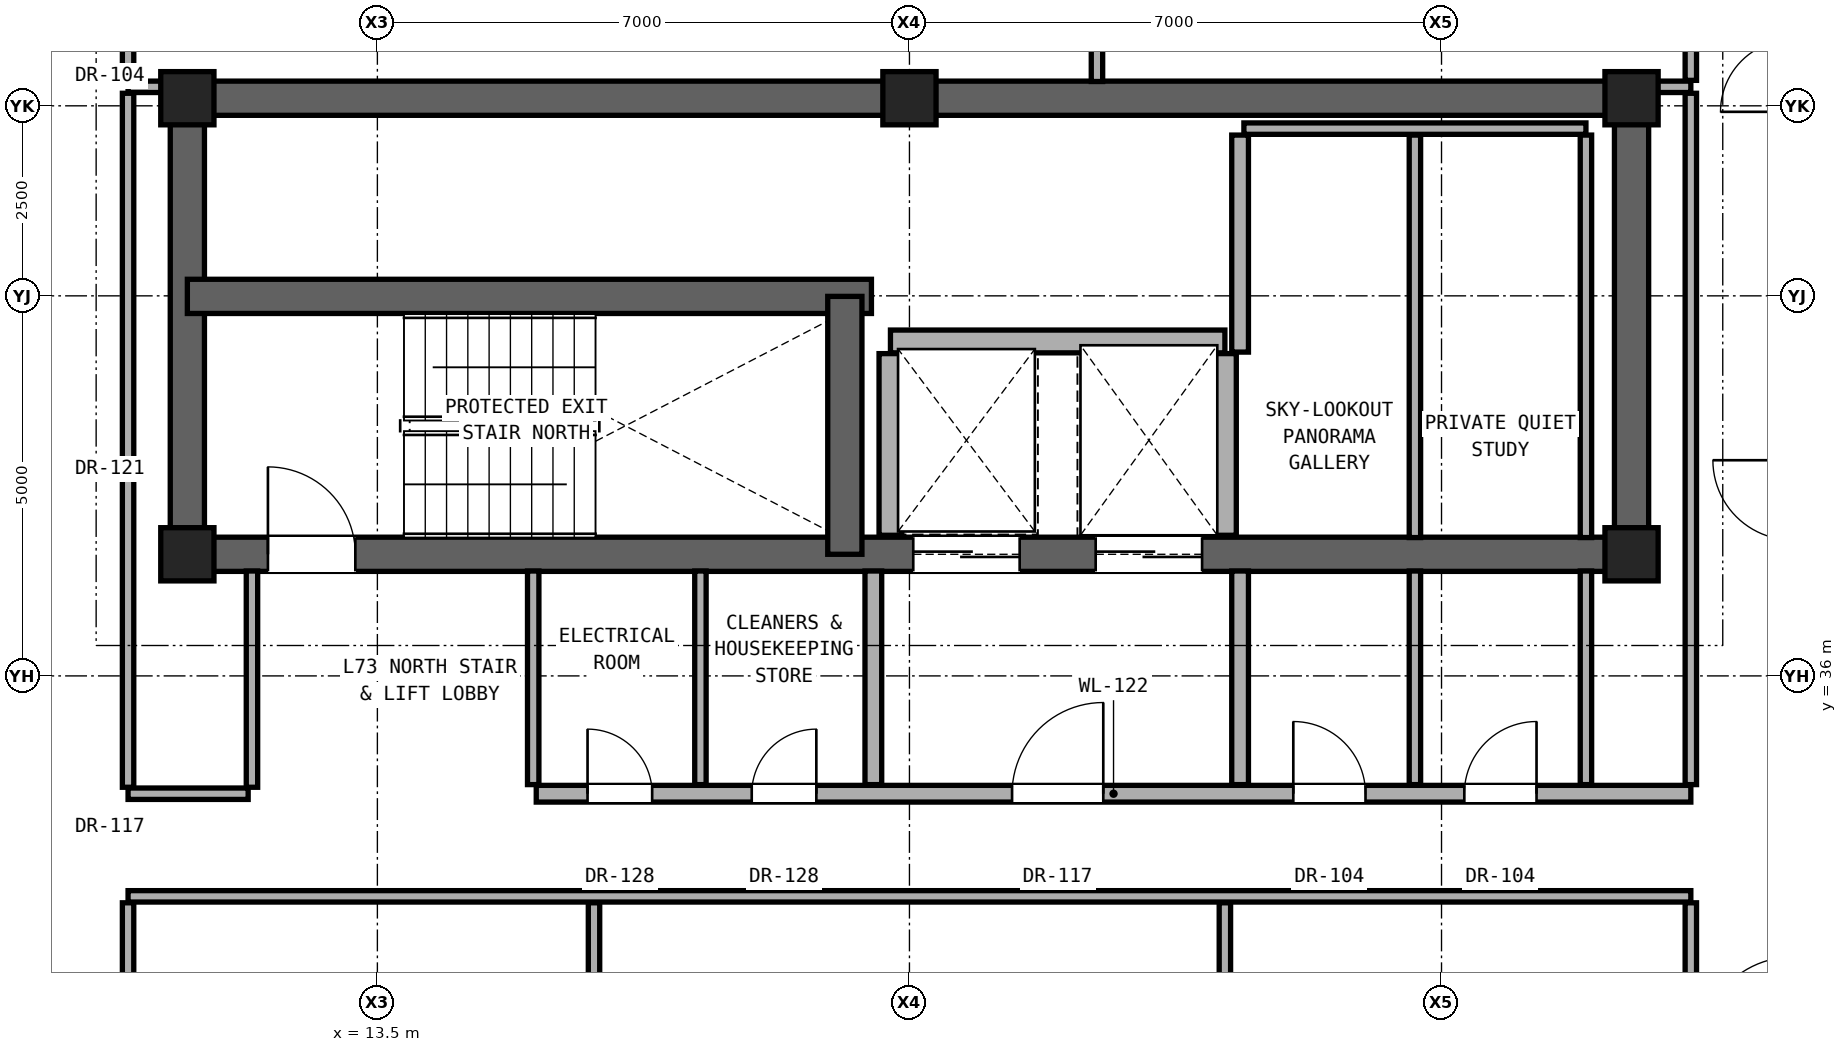
"""IFC4 building model, lengths in metres.
Left out: names, types, materials, properties, quantities, classifications, styles, units other than length and angle.
Written with IfcOpenShell. Run it as: python <this file> out.ifc"""

import sys

from ifc_helpers import new_model, si_unit, direction, frame, frame_2d, origin, origin_2d, place, context, subcontext, project, spatial, rectangle, extrude, element, fill, save


model = new_model("IFC4")
c1 = context("Model", 3, precision=1e-05, world=origin(), true_north=direction((0.0, 1.0)))
c2 = subcontext(c1, "Body", "Model", "MODEL_VIEW")
j1 = project(units=[si_unit("LENGTHUNIT", "METRE"), si_unit("PLANEANGLEUNIT", "RADIAN")], contexts=[c1])
p1 = place(None, origin())
s1 = spatial("IfcSite", under=j1, at=p1, CompositionType="ELEMENT")
p2 = place(p1, origin())
s2 = spatial("IfcBuilding", under=s1, at=p2, CompositionType="ELEMENT")
p3 = place(p2, frame((0.0, 0.0, 256.3)))
s3 = spatial("IfcBuildingStorey", under=s2, at=p3, CompositionType="ELEMENT", Elevation=256.3)
for number, where, z_axis, x_axis in (
    (1, (11.0, 37.6, 0.0), (0.0, 0.0, 1.0), (1.0, 0.0, 0.0)),
    (2, (30.0, 37.6, 0.0), (0.0, 0.0, 1.0), (1.0, 0.0, 0.0)),
    (3, (11.0, 43.6, 0.0), (0.0, 0.0, 1.0), (1.0, 0.0, 0.0)),
    (4, (20.5, 43.6, 0.0), (0.0, 0.0, 1.0), (1.0, 0.0, 0.0)),
    (5, (30.0, 43.6, 0.0), (0.0, 0.0, 1.0), (1.0, 0.0, 0.0)),
):
    element("IfcColumn", number, at=place(p3, frame(where, z_axis=z_axis, x_axis=x_axis)), inside=s3, PredefinedType="COLUMN", context=c2, shape_type="SweptSolid", body=[
        extrude(rectangle(XDim=0.7, YDim=0.7, at=origin_2d()), origin(), (0.0, 0.0, 1.0), 3.6),
    ])
p4 = place(p3, frame((11.0, 43.6, 0.0), z_axis=(0.0, 0.0, 1.0), x_axis=(1.0, 0.0, 0.0)))
e6 = element("IfcWall", 6, at=p4, inside=s3, PredefinedType="SHEAR", context=c2, shape_type="SweptSolid", body=[
    extrude(rectangle(XDim=19.0, YDim=0.45, at=frame_2d((9.5, 0.0))), origin(), (0.0, 0.0, 1.0), 3.4),
])
for number, where, z_axis, x_axis in (
    (7, (11.0, 37.6, 0.0), (0.0, 0.0, 1.0), (0.0, 1.0, 0.0)),
    (8, (30.0, 37.6, 0.0), (0.0, 0.0, 1.0), (0.0, 1.0, 0.0)),
):
    element("IfcWall", number, at=place(p3, frame(where, z_axis=z_axis, x_axis=x_axis)), inside=s3, PredefinedType="SHEAR", context=c2, shape_type="SweptSolid", body=[
        extrude(rectangle(XDim=6.0, YDim=0.45, at=frame_2d((3.0, 0.0))), origin(), (0.0, 0.0, 1.0), 3.4),
    ])
p5 = place(p3, frame((11.0, 37.6, 0.0), z_axis=(0.0, 0.0, 1.0), x_axis=(1.0, 0.0, 0.0)))
e9 = element("IfcWall", 9, at=p5, inside=s3, PredefinedType="SHEAR", context=c2, shape_type="SweptSolid", body=[
    extrude(rectangle(XDim=19.0, YDim=0.45, at=frame_2d((9.5, 0.0))), origin(), (0.0, 0.0, 1.0), 3.4),
])
p6 = place(p5, frame((1.06, 0.0, 0.0)))
e10 = element("IfcOpeningElement", 10, at=p6, cuts=e9, PredefinedType="OPENING", context=c2, shape_type="SweptSolid", body=[
    extrude(rectangle(XDim=1.15, YDim=2.2, at=frame_2d((0.575, 1.1))), frame((0.0, 0.235, 0.0), z_axis=(0.0, -1.0, 0.0), x_axis=(1.0, 0.0, 0.0)), (0.0, 0.0, 1.0), 0.47),
])
p7 = place(p5, frame((9.55, 0.0, 0.0)))
e11 = element("IfcOpeningElement", 11, at=p7, cuts=e9, PredefinedType="OPENING", context=c2, shape_type="SweptSolid", body=[
    extrude(rectangle(XDim=1.4, YDim=2.35, at=frame_2d((0.7, 1.175))), frame((0.0, 0.235, 0.0), z_axis=(0.0, -1.0, 0.0), x_axis=(1.0, 0.0, 0.0)), (0.0, 0.0, 1.0), 0.47),
])
p8 = place(p5, frame((11.95, 0.0, 0.0)))
e12 = element("IfcOpeningElement", 12, at=p8, cuts=e9, PredefinedType="OPENING", context=c2, shape_type="SweptSolid", body=[
    extrude(rectangle(XDim=1.4, YDim=2.35, at=frame_2d((0.7, 1.175))), frame((0.0, 0.235, 0.0), z_axis=(0.0, -1.0, 0.0), x_axis=(1.0, 0.0, 0.0)), (0.0, 0.0, 1.0), 0.47),
])
p9 = place(p3, frame((11.0, 40.993, 0.0), z_axis=(0.0, 0.0, 1.0), x_axis=(1.0, 0.0, 0.0)))
e13 = element("IfcWall", 13, at=p9, inside=s3, PredefinedType="SHEAR", context=c2, shape_type="SweptSolid", body=[
    extrude(rectangle(XDim=9.0, YDim=0.45, at=frame_2d((4.5, 0.0))), origin(), (0.0, 0.0, 1.0), 3.4),
])
p10 = place(p3, frame((19.65, 37.6, 0.0), z_axis=(0.0, 0.0, 1.0), x_axis=(0.0, 1.0, 0.0)))
e14 = element("IfcWall", 14, at=p10, inside=s3, PredefinedType="SHEAR", context=c2, shape_type="SweptSolid", body=[
    extrude(rectangle(XDim=3.393, YDim=0.45, at=frame_2d((1.696, 0.0))), origin(), (0.0, 0.0, 1.0), 3.4),
])
p11 = place(p3, frame((10.22, 33.1, 0.0), z_axis=(0.0, 0.0, 1.0), x_axis=(1.0, 0.0, 0.0)))
e15 = element("IfcWall", 15, at=p11, inside=s3, PredefinedType="PARTITIONING", context=c2, shape_type="SweptSolid", body=[
    extrude(rectangle(XDim=20.56, YDim=0.15, at=frame_2d((10.28, 0.0))), origin(), (0.0, 0.0, 1.0), 2.536),
])
p12 = place(p3, frame((10.22, 34.45, 0.0), z_axis=(0.0, 0.0, 1.0), x_axis=(1.0, 0.0, 0.0)))
e16 = element("IfcWall", 16, at=p12, inside=s3, PredefinedType="PARTITIONING", context=c2, shape_type="SweptSolid", body=[
    extrude(rectangle(XDim=1.58, YDim=0.15, at=frame_2d((0.79, 0.0))), origin(), (0.0, 0.0, 1.0), 2.536),
])
p13 = place(p3, frame((15.59, 34.45, 0.0), z_axis=(0.0, 0.0, 1.0), x_axis=(1.0, 0.0, 0.0)))
e17 = element("IfcWall", 17, at=p13, inside=s3, PredefinedType="SOLIDWALL", context=c2, shape_type="SweptSolid", body=[
    extrude(rectangle(XDim=15.19, YDim=0.22, at=frame_2d((7.595, 0.0))), origin(), (0.0, 0.0, 1.0), 2.536),
])
p14 = place(p13, frame((6.26, 0.0, 0.0)))
e18 = element("IfcOpeningElement", 18, at=p14, cuts=e17, PredefinedType="OPENING", context=c2, shape_type="SweptSolid", body=[
    extrude(rectangle(XDim=1.2, YDim=2.25, at=frame_2d((0.6, 1.125))), frame((0.0, 0.12, 0.0), z_axis=(0.0, -1.0, 0.0), x_axis=(1.0, 0.0, 0.0)), (0.0, 0.0, 1.0), 0.24),
])
p15 = place(p13, frame((9.96, 0.0, 0.0)))
e19 = element("IfcOpeningElement", 19, at=p15, cuts=e17, PredefinedType="OPENING", context=c2, shape_type="SweptSolid", body=[
    extrude(rectangle(XDim=0.95, YDim=2.15, at=frame_2d((0.475, 1.075))), frame((0.0, 0.12, 0.0), z_axis=(0.0, -1.0, 0.0), x_axis=(1.0, 0.0, 0.0)), (0.0, 0.0, 1.0), 0.24),
])
p16 = place(p13, frame((12.21, 0.0, 0.0)))
e20 = element("IfcOpeningElement", 20, at=p16, cuts=e17, PredefinedType="OPENING", context=c2, shape_type="SweptSolid", body=[
    extrude(rectangle(XDim=0.95, YDim=2.15, at=frame_2d((0.475, 1.075))), frame((0.0, 0.12, 0.0), z_axis=(0.0, -1.0, 0.0), x_axis=(1.0, 0.0, 0.0)), (0.0, 0.0, 1.0), 0.24),
])
p17 = place(p13, frame((0.675, 0.0, 0.0)))
e21 = element("IfcOpeningElement", 21, at=p17, cuts=e17, PredefinedType="OPENING", context=c2, shape_type="SweptSolid", body=[
    extrude(rectangle(XDim=0.85, YDim=2.01, at=frame_2d((0.425, 1.005))), frame((0.0, 0.12, 0.0), z_axis=(0.0, -1.0, 0.0), x_axis=(1.0, 0.0, 0.0)), (0.0, 0.0, 1.0), 0.24),
])
p18 = place(p13, frame((2.835, 0.0, 0.0)))
e22 = element("IfcOpeningElement", 22, at=p18, cuts=e17, PredefinedType="OPENING", context=c2, shape_type="SweptSolid", body=[
    extrude(rectangle(XDim=0.85, YDim=2.01, at=frame_2d((0.425, 1.005))), frame((0.0, 0.12, 0.0), z_axis=(0.0, -1.0, 0.0), x_axis=(1.0, 0.0, 0.0)), (0.0, 0.0, 1.0), 0.24),
])
p19 = place(p3, frame((20.25, 40.4, 0.0), z_axis=(0.0, 0.0, 1.0), x_axis=(1.0, 0.0, 0.0)))
e23 = element("IfcWall", 23, at=p19, inside=s3, PredefinedType="SOLIDWALL", context=c2, shape_type="SweptSolid", body=[
    extrude(rectangle(XDim=4.4, YDim=0.3, at=frame_2d((2.2, 0.0))), origin(), (0.0, 0.0, 1.0), 3.4),
])
p20 = place(p3, frame((24.9, 43.2, 0.0), z_axis=(0.0, 0.0, 1.0), x_axis=(1.0, 0.0, 0.0)))
e24 = element("IfcWall", 24, at=p20, inside=s3, PredefinedType="PARTITIONING", context=c2, shape_type="SweptSolid", body=[
    extrude(rectangle(XDim=4.5, YDim=0.15, at=frame_2d((2.25, 0.0))), origin(), (0.0, 0.0, 1.0), 3.4),
])
for number, where, z_axis, x_axis in (
    (25, (10.22, 43.75, 0.0), (0.0, 0.0, 1.0), (1.0, 0.0, 0.0)),
    (26, (30.22, 43.75, 0.0), (0.0, 0.0, 1.0), (1.0, 0.0, 0.0)),
):
    element("IfcWall", number, at=place(p3, frame(where, z_axis=z_axis, x_axis=x_axis)), inside=s3, PredefinedType="PARTITIONING", context=c2, shape_type="SweptSolid", body=[
        extrude(rectangle(XDim=0.56, YDim=0.15, at=frame_2d((0.28, 0.0))), origin(), (0.0, 0.0, 1.0), 3.4),
    ])
p21 = place(p3, frame((10.22, 22.935, 0.0), z_axis=(0.0, 0.0, 1.0), x_axis=(0.0, 1.0, 0.0)))
e27 = element("IfcWall", 27, at=p21, inside=s3, PredefinedType="PARTITIONING", context=c2, shape_type="SweptSolid", body=[
    extrude(rectangle(XDim=10.08, YDim=0.15, at=frame_2d((5.04, 0.0))), origin(), (0.0, 0.0, 1.0), 2.696),
])
p22 = place(p21, frame((4.44, 0.0, 0.0)))
e28 = element("IfcOpeningElement", 28, at=p22, cuts=e27, PredefinedType="OPENING", context=c2, shape_type="SweptSolid", body=[
    extrude(rectangle(XDim=1.2, YDim=2.25, at=frame_2d((0.6, 1.125))), frame((0.0, 0.085, 0.0), z_axis=(0.0, -1.0, 0.0), x_axis=(1.0, 0.0, 0.0)), (0.0, 0.0, 1.0), 0.17),
])
p23 = place(p3, frame((10.22, 34.535, 0.0), z_axis=(0.0, 0.0, 1.0), x_axis=(0.0, 1.0, 0.0)))
e29 = element("IfcWall", 29, at=p23, inside=s3, PredefinedType="PARTITIONING", context=c2, shape_type="SweptSolid", body=[
    extrude(rectangle(XDim=9.13, YDim=0.15, at=frame_2d((4.565, 0.0))), origin(), (0.0, 0.0, 1.0), 2.792),
])
p24 = place(p3, frame((10.22, 43.835, 0.0), z_axis=(0.0, 0.0, 1.0), x_axis=(0.0, 1.0, 0.0)))
e30 = element("IfcWall", 30, at=p24, inside=s3, PredefinedType="PARTITIONING", context=c2, shape_type="SweptSolid", body=[
    extrude(rectangle(XDim=2.651, YDim=0.15, at=frame_2d((1.326, 0.0))), origin(), (0.0, 0.0, 1.0), 3.4),
])
p25 = place(p24, frame((0.801, 0.0, 0.0)))
e31 = element("IfcOpeningElement", 31, at=p25, cuts=e30, PredefinedType="OPENING", context=c2, shape_type="SweptSolid", body=[
    extrude(rectangle(XDim=1.05, YDim=2.2, at=frame_2d((0.525, 1.1))), frame((0.0, 0.085, 0.0), z_axis=(0.0, -1.0, 0.0), x_axis=(1.0, 0.0, 0.0)), (0.0, 0.0, 1.0), 0.17),
])
p26 = place(p3, frame((11.85, 34.535, 0.0), z_axis=(0.0, 0.0, 1.0), x_axis=(0.0, 1.0, 0.0)))
e32 = element("IfcWall", 32, at=p26, inside=s3, PredefinedType="PARTITIONING", context=c2, shape_type="SweptSolid", body=[
    extrude(rectangle(XDim=2.845, YDim=0.15, at=frame_2d((1.422, 0.0))), origin(), (0.0, 0.0, 1.0), 3.4),
])
p27 = place(p3, frame((15.55, 34.57, 0.0), z_axis=(0.0, 0.0, 1.0), x_axis=(0.0, 1.0, 0.0)))
e33 = element("IfcWall", 33, at=p27, inside=s3, PredefinedType="PARTITIONING", context=c2, shape_type="SweptSolid", body=[
    extrude(rectangle(XDim=2.81, YDim=0.15, at=frame_2d((1.405, 0.0))), origin(), (0.0, 0.0, 1.0), 3.4),
])
p28 = place(p3, frame((16.35, 24.385, 0.0), z_axis=(0.0, 0.0, 1.0), x_axis=(0.0, 1.0, 0.0)))
e34 = element("IfcWall", 34, at=p28, inside=s3, PredefinedType="PARTITIONING", context=c2, shape_type="SweptSolid", body=[
    extrude(rectangle(XDim=8.63, YDim=0.15, at=frame_2d((4.315, 0.0))), origin(), (0.0, 0.0, 1.0), 2.536),
])
p29 = place(p3, frame((17.75, 34.57, 0.0), z_axis=(0.0, 0.0, 1.0), x_axis=(0.0, 1.0, 0.0)))
e35 = element("IfcWall", 35, at=p29, inside=s3, PredefinedType="PARTITIONING", context=c2, shape_type="SweptSolid", body=[
    extrude(rectangle(XDim=2.81, YDim=0.15, at=frame_2d((1.405, 0.0))), origin(), (0.0, 0.0, 1.0), 3.4),
])
p30 = place(p3, frame((20.025, 34.57, 0.0), z_axis=(0.0, 0.0, 1.0), x_axis=(0.0, 1.0, 0.0)))
e36 = element("IfcWall", 36, at=p30, inside=s3, PredefinedType="SOLIDWALL", context=c2, shape_type="SweptSolid", body=[
    extrude(rectangle(XDim=2.81, YDim=0.22, at=frame_2d((1.405, 0.0))), origin(), (0.0, 0.0, 1.0), 3.4),
])
p31 = place(p3, frame((20.25, 37.85, 0.0), z_axis=(0.0, 0.0, 1.0), x_axis=(0.0, 1.0, 0.0)))
e37 = element("IfcWall", 37, at=p31, inside=s3, PredefinedType="SOLIDWALL", context=c2, shape_type="SweptSolid", body=[
    extrude(rectangle(XDim=2.39, YDim=0.3, at=frame_2d((1.195, 0.0))), origin(), (0.0, 0.0, 1.0), 3.4),
])
p32 = place(p3, frame((22.967, 43.82, 0.0), z_axis=(0.0, 0.0, 1.0), x_axis=(0.0, 1.0, 0.0)))
e38 = element("IfcWall", 38, at=p32, inside=s3, PredefinedType="PARTITIONING", context=c2, shape_type="SweptSolid", body=[
    extrude(rectangle(XDim=2.666, YDim=0.15, at=frame_2d((1.333, 0.0))), origin(), (0.0, 0.0, 1.0), 3.4),
])
p33 = place(p3, frame((24.65, 24.385, 0.0), z_axis=(0.0, 0.0, 1.0), x_axis=(0.0, 1.0, 0.0)))
e39 = element("IfcWall", 39, at=p33, inside=s3, PredefinedType="PARTITIONING", context=c2, shape_type="SweptSolid", body=[
    extrude(rectangle(XDim=8.63, YDim=0.15, at=frame_2d((4.315, 0.0))), origin(), (0.0, 0.0, 1.0), 2.536),
])
p34 = place(p3, frame((24.65, 37.85, 0.0), z_axis=(0.0, 0.0, 1.0), x_axis=(0.0, 1.0, 0.0)))
e40 = element("IfcWall", 40, at=p34, inside=s3, PredefinedType="SOLIDWALL", context=c2, shape_type="SweptSolid", body=[
    extrude(rectangle(XDim=2.39, YDim=0.3, at=frame_2d((1.195, 0.0))), origin(), (0.0, 0.0, 1.0), 3.4),
])
p35 = place(p3, frame((24.85, 34.57, 0.0), z_axis=(0.0, 0.0, 1.0), x_axis=(0.0, 1.0, 0.0)))
e41 = element("IfcWall", 41, at=p35, inside=s3, PredefinedType="SOLIDWALL", context=c2, shape_type="SweptSolid", body=[
    extrude(rectangle(XDim=2.81, YDim=0.22, at=frame_2d((1.405, 0.0))), origin(), (0.0, 0.0, 1.0), 3.4),
])
p36 = place(p3, frame((24.85, 40.26, 0.0), z_axis=(0.0, 0.0, 1.0), x_axis=(0.0, 1.0, 0.0)))
e42 = element("IfcWall", 42, at=p36, inside=s3, PredefinedType="SOLIDWALL", context=c2, shape_type="SweptSolid", body=[
    extrude(rectangle(XDim=2.855, YDim=0.22, at=frame_2d((1.427, 0.0))), origin(), (0.0, 0.0, 1.0), 3.4),
])
p37 = place(p3, frame((27.15, 34.57, 0.0), z_axis=(0.0, 0.0, 1.0), x_axis=(0.0, 1.0, 0.0)))
e43 = element("IfcWall", 43, at=p37, inside=s3, PredefinedType="PARTITIONING", context=c2, shape_type="SweptSolid", body=[
    extrude(rectangle(XDim=2.81, YDim=0.15, at=frame_2d((1.405, 0.0))), origin(), (0.0, 0.0, 1.0), 3.4),
])
p38 = place(p3, frame((27.15, 37.82, 0.0), z_axis=(0.0, 0.0, 1.0), x_axis=(0.0, 1.0, 0.0)))
e44 = element("IfcWall", 44, at=p38, inside=s3, PredefinedType="PARTITIONING", context=c2, shape_type="SweptSolid", body=[
    extrude(rectangle(XDim=5.295, YDim=0.15, at=frame_2d((2.647, 0.0))), origin(), (0.0, 0.0, 1.0), 3.4),
])
p39 = place(p3, frame((29.4, 34.57, 0.0), z_axis=(0.0, 0.0, 1.0), x_axis=(0.0, 1.0, 0.0)))
e45 = element("IfcWall", 45, at=p39, inside=s3, PredefinedType="PARTITIONING", context=c2, shape_type="SweptSolid", body=[
    extrude(rectangle(XDim=2.81, YDim=0.15, at=frame_2d((1.405, 0.0))), origin(), (0.0, 0.0, 1.0), 3.4),
])
p40 = place(p3, frame((29.4, 37.82, 0.0), z_axis=(0.0, 0.0, 1.0), x_axis=(0.0, 1.0, 0.0)))
e46 = element("IfcWall", 46, at=p40, inside=s3, PredefinedType="PARTITIONING", context=c2, shape_type="SweptSolid", body=[
    extrude(rectangle(XDim=5.295, YDim=0.15, at=frame_2d((2.647, 0.0))), origin(), (0.0, 0.0, 1.0), 3.4),
])
p41 = place(p3, frame((30.78, 19.985, 0.0), z_axis=(0.0, 0.0, 1.0), x_axis=(0.0, 1.0, 0.0)))
e47 = element("IfcWall", 47, at=p41, inside=s3, PredefinedType="PARTITIONING", context=c2, shape_type="SweptSolid", body=[
    extrude(rectangle(XDim=13.03, YDim=0.15, at=frame_2d((6.515, 0.0))), origin(), (0.0, 0.0, 1.0), 2.696),
])
p42 = place(p41, frame((5.915, 0.0, 0.0)))
e48 = element("IfcOpeningElement", 48, at=p42, cuts=e47, PredefinedType="OPENING", context=c2, shape_type="SweptSolid", body=[
    extrude(rectangle(XDim=1.2, YDim=2.25, at=frame_2d((0.6, 1.125))), frame((0.0, 0.085, 0.0), z_axis=(0.0, -1.0, 0.0), x_axis=(1.0, 0.0, 0.0)), (0.0, 0.0, 1.0), 0.17),
])
p43 = place(p3, frame((30.78, 34.57, 0.0), z_axis=(0.0, 0.0, 1.0), x_axis=(0.0, 1.0, 0.0)))
e49 = element("IfcWall", 49, at=p43, inside=s3, PredefinedType="PARTITIONING", context=c2, shape_type="SweptSolid", body=[
    extrude(rectangle(XDim=9.095, YDim=0.15, at=frame_2d((4.547, 0.0))), origin(), (0.0, 0.0, 1.0), 2.792),
])
p44 = place(p3, frame((30.78, 43.835, 0.0), z_axis=(0.0, 0.0, 1.0), x_axis=(0.0, 1.0, 0.0)))
e50 = element("IfcWall", 50, at=p44, inside=s3, PredefinedType="PARTITIONING", context=c2, shape_type="SweptSolid", body=[
    extrude(rectangle(XDim=2.651, YDim=0.15, at=frame_2d((1.326, 0.0))), origin(), (0.0, 0.0, 1.0), 3.4),
])
p45 = place(p44, frame((0.801, 0.0, 0.0)))
e51 = element("IfcOpeningElement", 51, at=p45, cuts=e50, PredefinedType="OPENING", context=c2, shape_type="SweptSolid", body=[
    extrude(rectangle(XDim=1.05, YDim=2.2, at=frame_2d((0.525, 1.1))), frame((0.0, 0.085, 0.0), z_axis=(0.0, -1.0, 0.0), x_axis=(1.0, 0.0, 0.0)), (0.0, 0.0, 1.0), 0.17),
])
p46 = place(p6, origin())
e52 = element("IfcDoor", 52, at=p46, inside=s3, OperationType="SINGLE_SWING_LEFT", PredefinedType="DOOR", context=c2, shape_type="SweptSolid", body=[
    extrude(rectangle(XDim=1.15, YDim=2.2, at=frame_2d((0.575, 1.1))), frame((0.0, 0.025, 0.0), z_axis=(0.0, -1.0, 0.0), x_axis=(1.0, 0.0, 0.0)), (0.0, 0.0, 1.0), 0.05),
])
fill(e10, e52)
p47 = place(p14, origin())
e53 = element("IfcDoor", 53, at=p47, inside=s3, OperationType="SINGLE_SWING_RIGHT", PredefinedType="DOOR", context=c2, shape_type="SweptSolid", body=[
    extrude(rectangle(XDim=1.2, YDim=2.25, at=frame_2d((0.6, 1.125))), frame((0.0, 0.025, 0.0), z_axis=(0.0, -1.0, 0.0), x_axis=(1.0, 0.0, 0.0)), (0.0, 0.0, 1.0), 0.05),
])
fill(e18, e53)
p48 = place(p15, origin())
e54 = element("IfcDoor", 54, at=p48, inside=s3, OperationType="SINGLE_SWING_LEFT", PredefinedType="DOOR", context=c2, shape_type="SweptSolid", body=[
    extrude(rectangle(XDim=0.95, YDim=2.15, at=frame_2d((0.475, 1.075))), frame((0.0, 0.025, 0.0), z_axis=(0.0, -1.0, 0.0), x_axis=(1.0, 0.0, 0.0)), (0.0, 0.0, 1.0), 0.05),
])
fill(e19, e54)
p49 = place(p16, origin())
e55 = element("IfcDoor", 55, at=p49, inside=s3, OperationType="SINGLE_SWING_RIGHT", PredefinedType="DOOR", context=c2, shape_type="SweptSolid", body=[
    extrude(rectangle(XDim=0.95, YDim=2.15, at=frame_2d((0.475, 1.075))), frame((0.0, 0.025, 0.0), z_axis=(0.0, -1.0, 0.0), x_axis=(1.0, 0.0, 0.0)), (0.0, 0.0, 1.0), 0.05),
])
fill(e20, e55)
p50 = place(p17, origin())
e56 = element("IfcDoor", 56, at=p50, inside=s3, OperationType="SINGLE_SWING_LEFT", PredefinedType="DOOR", context=c2, shape_type="SweptSolid", body=[
    extrude(rectangle(XDim=0.85, YDim=2.01, at=frame_2d((0.425, 1.005))), frame((0.0, 0.025, 0.0), z_axis=(0.0, -1.0, 0.0), x_axis=(1.0, 0.0, 0.0)), (0.0, 0.0, 1.0), 0.05),
])
fill(e21, e56)
p51 = place(p18, origin())
e57 = element("IfcDoor", 57, at=p51, inside=s3, OperationType="SINGLE_SWING_RIGHT", PredefinedType="DOOR", context=c2, shape_type="SweptSolid", body=[
    extrude(rectangle(XDim=0.85, YDim=2.01, at=frame_2d((0.425, 1.005))), frame((0.0, 0.025, 0.0), z_axis=(0.0, -1.0, 0.0), x_axis=(1.0, 0.0, 0.0)), (0.0, 0.0, 1.0), 0.05),
])
fill(e22, e57)
p52 = place(p7, origin())
e58 = element("IfcDoor", 58, at=p52, inside=s3, OperationType="DOUBLE_DOOR_SLIDING", PredefinedType="DOOR", context=c2, shape_type="SweptSolid", body=[
    extrude(rectangle(XDim=1.4, YDim=2.35, at=frame_2d((0.7, 1.175))), frame((0.0, 0.025, 0.0), z_axis=(0.0, -1.0, 0.0), x_axis=(1.0, 0.0, 0.0)), (0.0, 0.0, 1.0), 0.05),
])
fill(e11, e58)
p53 = place(p8, origin())
e59 = element("IfcDoor", 59, at=p53, inside=s3, OperationType="DOUBLE_DOOR_SLIDING", PredefinedType="DOOR", context=c2, shape_type="SweptSolid", body=[
    extrude(rectangle(XDim=1.4, YDim=2.35, at=frame_2d((0.7, 1.175))), frame((0.0, 0.025, 0.0), z_axis=(0.0, -1.0, 0.0), x_axis=(1.0, 0.0, 0.0)), (0.0, 0.0, 1.0), 0.05),
])
fill(e12, e59)
save(model, sys.argv[1])
